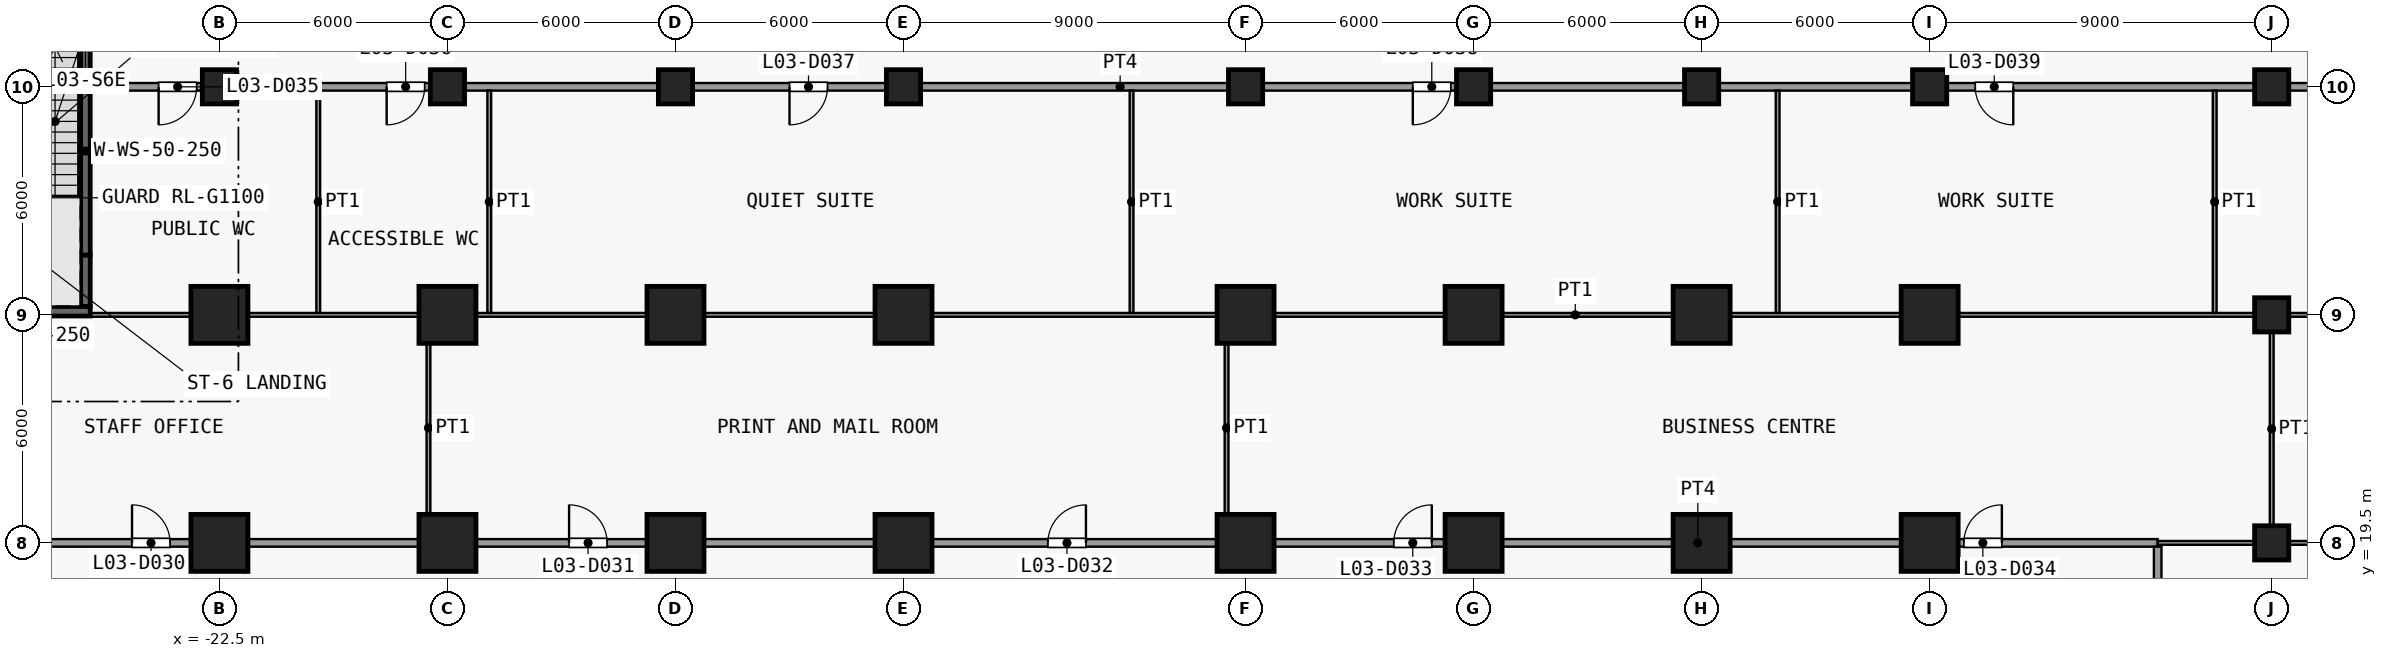
"""IFC4 building model, lengths in metres.
Left out: names, types, materials, properties, quantities, classifications, styles, units other than length and angle.
Written with IfcOpenShell. Run it as: python <this file> out.ifc"""

import sys

from ifc_helpers import new_model, si_unit, direction, frame, frame_2d, origin, origin_2d, place, context, subcontext, project, spatial, rectangle, extrude, element, fill, save


model = new_model("IFC4")
c1 = context("Model", 3, precision=1e-05, world=origin(), true_north=direction((0.0, 1.0)))
c2 = subcontext(c1, "Body", "Model", "MODEL_VIEW")
j1 = project(units=[si_unit("LENGTHUNIT", "METRE"), si_unit("PLANEANGLEUNIT", "RADIAN")], contexts=[c1])
p1 = place(None, origin())
s1 = spatial("IfcSite", under=j1, at=p1, CompositionType="ELEMENT")
p2 = place(p1, origin())
s2 = spatial("IfcBuilding", under=s1, at=p2, CompositionType="ELEMENT")
p3 = place(p2, frame((0.0, 0.0, 18.5)))
s3 = spatial("IfcBuildingStorey", under=s2, at=p3, CompositionType="ELEMENT", Elevation=18.5)
for number, where, z_axis, x_axis in (
    (1, (-22.5, 19.5, 0.0), (0.0, 0.0, 1.0), (1.0, 0.0, 0.0)),
    (2, (-22.5, 25.5, 0.0), (0.0, 0.0, 1.0), (1.0, 0.0, 0.0)),
):
    element("IfcColumn", number, at=place(p3, frame(where, z_axis=z_axis, x_axis=x_axis)), inside=s3, PredefinedType="COLUMN", context=c2, shape_type="SweptSolid", body=[
        extrude(rectangle(XDim=1.5, YDim=1.5, at=origin_2d()), origin(), (0.0, 0.0, 1.0), 5.0),
    ])
p4 = place(p3, frame((-22.5, 31.5, 0.0), z_axis=(0.0, 0.0, 1.0), x_axis=(1.0, 0.0, 0.0)))
e3 = element("IfcColumn", 3, at=p4, inside=s3, PredefinedType="COLUMN", context=c2, shape_type="SweptSolid", body=[
    extrude(rectangle(XDim=0.9, YDim=0.9, at=origin_2d()), origin(), (0.0, 0.0, 1.0), 5.0),
])
for number, where, z_axis, x_axis in (
    (4, (-16.5, 19.5, 0.0), (0.0, 0.0, 1.0), (1.0, 0.0, 0.0)),
    (5, (-16.5, 25.5, 0.0), (0.0, 0.0, 1.0), (1.0, 0.0, 0.0)),
):
    element("IfcColumn", number, at=place(p3, frame(where, z_axis=z_axis, x_axis=x_axis)), inside=s3, PredefinedType="COLUMN", context=c2, shape_type="SweptSolid", body=[
        extrude(rectangle(XDim=1.5, YDim=1.5, at=origin_2d()), origin(), (0.0, 0.0, 1.0), 5.0),
    ])
p5 = place(p3, frame((-16.5, 31.5, 0.0), z_axis=(0.0, 0.0, 1.0), x_axis=(1.0, 0.0, 0.0)))
e6 = element("IfcColumn", 6, at=p5, inside=s3, PredefinedType="COLUMN", context=c2, shape_type="SweptSolid", body=[
    extrude(rectangle(XDim=0.9, YDim=0.9, at=origin_2d()), origin(), (0.0, 0.0, 1.0), 5.0),
])
for number, where, z_axis, x_axis in (
    (7, (-10.5, 19.5, 0.0), (0.0, 0.0, 1.0), (1.0, 0.0, 0.0)),
    (8, (-10.5, 25.5, 0.0), (0.0, 0.0, 1.0), (1.0, 0.0, 0.0)),
):
    element("IfcColumn", number, at=place(p3, frame(where, z_axis=z_axis, x_axis=x_axis)), inside=s3, PredefinedType="COLUMN", context=c2, shape_type="SweptSolid", body=[
        extrude(rectangle(XDim=1.5, YDim=1.5, at=origin_2d()), origin(), (0.0, 0.0, 1.0), 5.0),
    ])
p6 = place(p3, frame((-10.5, 31.5, 0.0), z_axis=(0.0, 0.0, 1.0), x_axis=(1.0, 0.0, 0.0)))
e9 = element("IfcColumn", 9, at=p6, inside=s3, PredefinedType="COLUMN", context=c2, shape_type="SweptSolid", body=[
    extrude(rectangle(XDim=0.9, YDim=0.9, at=origin_2d()), origin(), (0.0, 0.0, 1.0), 5.0),
])
for number, where, z_axis, x_axis in (
    (10, (-4.5, 19.5, 0.0), (0.0, 0.0, 1.0), (1.0, 0.0, 0.0)),
    (11, (-4.5, 25.5, 0.0), (0.0, 0.0, 1.0), (1.0, 0.0, 0.0)),
):
    element("IfcColumn", number, at=place(p3, frame(where, z_axis=z_axis, x_axis=x_axis)), inside=s3, PredefinedType="COLUMN", context=c2, shape_type="SweptSolid", body=[
        extrude(rectangle(XDim=1.5, YDim=1.5, at=origin_2d()), origin(), (0.0, 0.0, 1.0), 5.0),
    ])
p7 = place(p3, frame((-4.5, 31.5, 0.0), z_axis=(0.0, 0.0, 1.0), x_axis=(1.0, 0.0, 0.0)))
e12 = element("IfcColumn", 12, at=p7, inside=s3, PredefinedType="COLUMN", context=c2, shape_type="SweptSolid", body=[
    extrude(rectangle(XDim=0.9, YDim=0.9, at=origin_2d()), origin(), (0.0, 0.0, 1.0), 5.0),
])
for number, where, z_axis, x_axis in (
    (13, (4.5, 19.5, 0.0), (0.0, 0.0, 1.0), (1.0, 0.0, 0.0)),
    (14, (4.5, 25.5, 0.0), (0.0, 0.0, 1.0), (1.0, 0.0, 0.0)),
):
    element("IfcColumn", number, at=place(p3, frame(where, z_axis=z_axis, x_axis=x_axis)), inside=s3, PredefinedType="COLUMN", context=c2, shape_type="SweptSolid", body=[
        extrude(rectangle(XDim=1.5, YDim=1.5, at=origin_2d()), origin(), (0.0, 0.0, 1.0), 5.0),
    ])
p8 = place(p3, frame((4.5, 31.5, 0.0), z_axis=(0.0, 0.0, 1.0), x_axis=(1.0, 0.0, 0.0)))
e15 = element("IfcColumn", 15, at=p8, inside=s3, PredefinedType="COLUMN", context=c2, shape_type="SweptSolid", body=[
    extrude(rectangle(XDim=0.9, YDim=0.9, at=origin_2d()), origin(), (0.0, 0.0, 1.0), 5.0),
])
for number, where, z_axis, x_axis in (
    (16, (10.5, 19.5, 0.0), (0.0, 0.0, 1.0), (1.0, 0.0, 0.0)),
    (17, (10.5, 25.5, 0.0), (0.0, 0.0, 1.0), (1.0, 0.0, 0.0)),
):
    element("IfcColumn", number, at=place(p3, frame(where, z_axis=z_axis, x_axis=x_axis)), inside=s3, PredefinedType="COLUMN", context=c2, shape_type="SweptSolid", body=[
        extrude(rectangle(XDim=1.5, YDim=1.5, at=origin_2d()), origin(), (0.0, 0.0, 1.0), 5.0),
    ])
p9 = place(p3, frame((10.5, 31.5, 0.0), z_axis=(0.0, 0.0, 1.0), x_axis=(1.0, 0.0, 0.0)))
e18 = element("IfcColumn", 18, at=p9, inside=s3, PredefinedType="COLUMN", context=c2, shape_type="SweptSolid", body=[
    extrude(rectangle(XDim=0.9, YDim=0.9, at=origin_2d()), origin(), (0.0, 0.0, 1.0), 5.0),
])
for number, where, z_axis, x_axis in (
    (19, (16.5, 19.5, 0.0), (0.0, 0.0, 1.0), (1.0, 0.0, 0.0)),
    (20, (16.5, 25.5, 0.0), (0.0, 0.0, 1.0), (1.0, 0.0, 0.0)),
):
    element("IfcColumn", number, at=place(p3, frame(where, z_axis=z_axis, x_axis=x_axis)), inside=s3, PredefinedType="COLUMN", context=c2, shape_type="SweptSolid", body=[
        extrude(rectangle(XDim=1.5, YDim=1.5, at=origin_2d()), origin(), (0.0, 0.0, 1.0), 5.0),
    ])
p10 = place(p3, frame((16.5, 31.5, 0.0), z_axis=(0.0, 0.0, 1.0), x_axis=(1.0, 0.0, 0.0)))
e21 = element("IfcColumn", 21, at=p10, inside=s3, PredefinedType="COLUMN", context=c2, shape_type="SweptSolid", body=[
    extrude(rectangle(XDim=0.9, YDim=0.9, at=origin_2d()), origin(), (0.0, 0.0, 1.0), 5.0),
])
for number, where, z_axis, x_axis in (
    (22, (22.5, 19.5, 0.0), (0.0, 0.0, 1.0), (1.0, 0.0, 0.0)),
    (23, (22.5, 25.5, 0.0), (0.0, 0.0, 1.0), (1.0, 0.0, 0.0)),
):
    element("IfcColumn", number, at=place(p3, frame(where, z_axis=z_axis, x_axis=x_axis)), inside=s3, PredefinedType="COLUMN", context=c2, shape_type="SweptSolid", body=[
        extrude(rectangle(XDim=1.5, YDim=1.5, at=origin_2d()), origin(), (0.0, 0.0, 1.0), 5.0),
    ])
for number, where, z_axis, x_axis in (
    (24, (22.5, 31.5, 0.0), (0.0, 0.0, 1.0), (1.0, 0.0, 0.0)),
    (25, (31.5, 19.5, 0.0), (0.0, 0.0, 1.0), (1.0, 0.0, 0.0)),
    (26, (31.5, 25.5, 0.0), (0.0, 0.0, 1.0), (1.0, 0.0, 0.0)),
    (27, (31.5, 31.5, 0.0), (0.0, 0.0, 1.0), (1.0, 0.0, 0.0)),
):
    element("IfcColumn", number, at=place(p3, frame(where, z_axis=z_axis, x_axis=x_axis)), inside=s3, PredefinedType="COLUMN", context=c2, shape_type="SweptSolid", body=[
        extrude(rectangle(XDim=0.9, YDim=0.9, at=origin_2d()), origin(), (0.0, 0.0, 1.0), 5.0),
    ])
p11 = place(p3, frame((-26.025, 27.07, 0.0), z_axis=(0.0, 0.0, 1.0), x_axis=(0.0, 1.0, 0.0)))
e28 = element("IfcWall", 28, at=p11, inside=s3, PredefinedType="SHEAR", context=c2, shape_type="SweptSolid", body=[
    extrude(rectangle(XDim=5.48, YDim=0.25, at=frame_2d((2.74, 0.0))), origin(), (0.0, 0.0, 1.0), 4.65),
])
p12 = place(p3, frame((-26.025, 25.72, 0.0), z_axis=(0.0, 0.0, 1.0), x_axis=(0.0, 1.0, 0.0)))
e29 = element("IfcWall", 29, at=p12, inside=s3, PredefinedType="SHEAR", context=c2, shape_type="SweptSolid", body=[
    extrude(rectangle(XDim=1.35, YDim=0.25, at=frame_2d((0.675, 0.0))), origin(), (0.0, 0.0, 1.0), 4.65),
])
p13 = place(p3, frame((-29.25, 25.595, 0.0), z_axis=(0.0, 0.0, 1.0), x_axis=(1.0, 0.0, 0.0)))
e30 = element("IfcWall", 30, at=p13, inside=s3, PredefinedType="SHEAR", context=c2, shape_type="SweptSolid", body=[
    extrude(rectangle(XDim=3.35, YDim=0.25, at=frame_2d((1.675, 0.0))), origin(), (0.0, 0.0, 1.0), 4.65),
])
p14 = place(p3, frame((-31.6, 19.5, 0.0), z_axis=(0.0, 0.0, 1.0), x_axis=(1.0, 0.0, 0.0)))
e31 = element("IfcWall", 31, at=p14, inside=s3, PredefinedType="PARTITIONING", context=c2, shape_type="SweptSolid", body=[
    extrude(rectangle(XDim=60.1, YDim=0.2, at=frame_2d((30.05, 0.0))), origin(), (0.0, 0.0, 1.0), 4.65),
])
p15 = place(p14, frame((6.8, 0.0, 0.0)))
e32 = element("IfcOpeningElement", 32, at=p15, cuts=e31, PredefinedType="OPENING", context=c2, shape_type="SweptSolid", body=[
    extrude(rectangle(XDim=1.0, YDim=2.1, at=frame_2d((0.5, 1.05))), frame((0.0, 0.11, 0.0), z_axis=(0.0, -1.0, 0.0), x_axis=(1.0, 0.0, 0.0)), (0.0, 0.0, 1.0), 0.22),
])
p16 = place(p14, frame((18.3, 0.0, 0.0)))
e33 = element("IfcOpeningElement", 33, at=p16, cuts=e31, PredefinedType="OPENING", context=c2, shape_type="SweptSolid", body=[
    extrude(rectangle(XDim=1.0, YDim=2.1, at=frame_2d((0.5, 1.05))), frame((0.0, 0.11, 0.0), z_axis=(0.0, -1.0, 0.0), x_axis=(1.0, 0.0, 0.0)), (0.0, 0.0, 1.0), 0.22),
])
p17 = place(p14, frame((30.9, 0.0, 0.0)))
e34 = element("IfcOpeningElement", 34, at=p17, cuts=e31, PredefinedType="OPENING", context=c2, shape_type="SweptSolid", body=[
    extrude(rectangle(XDim=1.0, YDim=2.1, at=frame_2d((0.5, 1.05))), frame((0.0, 0.11, 0.0), z_axis=(0.0, -1.0, 0.0), x_axis=(1.0, 0.0, 0.0)), (0.0, 0.0, 1.0), 0.22),
])
p18 = place(p14, frame((40.0, 0.0, 0.0)))
e35 = element("IfcOpeningElement", 35, at=p18, cuts=e31, PredefinedType="OPENING", context=c2, shape_type="SweptSolid", body=[
    extrude(rectangle(XDim=1.0, YDim=2.1, at=frame_2d((0.5, 1.05))), frame((0.0, 0.11, 0.0), z_axis=(0.0, -1.0, 0.0), x_axis=(1.0, 0.0, 0.0)), (0.0, 0.0, 1.0), 0.22),
])
p19 = place(p14, frame((55.0, 0.0, 0.0)))
e36 = element("IfcOpeningElement", 36, at=p19, cuts=e31, PredefinedType="OPENING", context=c2, shape_type="SweptSolid", body=[
    extrude(rectangle(XDim=1.0, YDim=2.1, at=frame_2d((0.5, 1.05))), frame((0.0, 0.11, 0.0), z_axis=(0.0, -1.0, 0.0), x_axis=(1.0, 0.0, 0.0)), (0.0, 0.0, 1.0), 0.22),
])
p20 = place(p3, frame((28.5, 19.5, 0.0), z_axis=(0.0, 0.0, 1.0), x_axis=(1.0, 0.0, 0.0)))
e37 = element("IfcWall", 37, at=p20, inside=s3, PredefinedType="PARTITIONING", context=c2, shape_type="SweptSolid", body=[
    extrude(rectangle(XDim=23.9, YDim=0.1, at=frame_2d((11.95, 0.0))), origin(), (0.0, 0.0, 1.0), 4.65),
])
p21 = place(p3, frame((-25.9, 25.5, 0.0), z_axis=(0.0, 0.0, 1.0), x_axis=(1.0, 0.0, 0.0)))
e38 = element("IfcWall", 38, at=p21, inside=s3, PredefinedType="PARTITIONING", context=c2, shape_type="SweptSolid", body=[
    extrude(rectangle(XDim=78.15, YDim=0.1, at=frame_2d((39.075, 0.0))), origin(), (0.0, 0.0, 1.0), 4.65),
])
p22 = place(p3, frame((-25.9, 31.5, 0.0), z_axis=(0.0, 0.0, 1.0), x_axis=(1.0, 0.0, 0.0)))
e39 = element("IfcWall", 39, at=p22, inside=s3, PredefinedType="PARTITIONING", context=c2, shape_type="SweptSolid", body=[
    extrude(rectangle(XDim=78.15, YDim=0.2, at=frame_2d((39.075, 0.0))), origin(), (0.0, 0.0, 1.0), 4.65),
])
p23 = place(p22, frame((1.8, 0.0, 0.0)))
e40 = element("IfcOpeningElement", 40, at=p23, cuts=e39, PredefinedType="OPENING", context=c2, shape_type="SweptSolid", body=[
    extrude(rectangle(XDim=1.0, YDim=2.1, at=frame_2d((0.5, 1.05))), frame((0.0, 0.11, 0.0), z_axis=(0.0, -1.0, 0.0), x_axis=(1.0, 0.0, 0.0)), (0.0, 0.0, 1.0), 0.22),
])
p24 = place(p22, frame((7.8, 0.0, 0.0)))
e41 = element("IfcOpeningElement", 41, at=p24, cuts=e39, PredefinedType="OPENING", context=c2, shape_type="SweptSolid", body=[
    extrude(rectangle(XDim=1.0, YDim=2.1, at=frame_2d((0.5, 1.05))), frame((0.0, 0.11, 0.0), z_axis=(0.0, -1.0, 0.0), x_axis=(1.0, 0.0, 0.0)), (0.0, 0.0, 1.0), 0.22),
])
p25 = place(p22, frame((18.4, 0.0, 0.0)))
e42 = element("IfcOpeningElement", 42, at=p25, cuts=e39, PredefinedType="OPENING", context=c2, shape_type="SweptSolid", body=[
    extrude(rectangle(XDim=1.0, YDim=2.1, at=frame_2d((0.5, 1.05))), frame((0.0, 0.11, 0.0), z_axis=(0.0, -1.0, 0.0), x_axis=(1.0, 0.0, 0.0)), (0.0, 0.0, 1.0), 0.22),
])
p26 = place(p22, frame((34.8, 0.0, 0.0)))
e43 = element("IfcOpeningElement", 43, at=p26, cuts=e39, PredefinedType="OPENING", context=c2, shape_type="SweptSolid", body=[
    extrude(rectangle(XDim=1.0, YDim=2.1, at=frame_2d((0.5, 1.05))), frame((0.0, 0.11, 0.0), z_axis=(0.0, -1.0, 0.0), x_axis=(1.0, 0.0, 0.0)), (0.0, 0.0, 1.0), 0.22),
])
p27 = place(p22, frame((49.6, 0.0, 0.0)))
e44 = element("IfcOpeningElement", 44, at=p27, cuts=e39, PredefinedType="OPENING", context=c2, shape_type="SweptSolid", body=[
    extrude(rectangle(XDim=1.0, YDim=2.1, at=frame_2d((0.5, 1.05))), frame((0.0, 0.11, 0.0), z_axis=(0.0, -1.0, 0.0), x_axis=(1.0, 0.0, 0.0)), (0.0, 0.0, 1.0), 0.22),
])
p28 = place(p22, frame((59.9, 0.0, 0.0)))
e45 = element("IfcOpeningElement", 45, at=p28, cuts=e39, PredefinedType="OPENING", context=c2, shape_type="SweptSolid", body=[
    extrude(rectangle(XDim=1.0, YDim=2.1, at=frame_2d((0.5, 1.05))), frame((0.0, 0.11, 0.0), z_axis=(0.0, -1.0, 0.0), x_axis=(1.0, 0.0, 0.0)), (0.0, 0.0, 1.0), 0.22),
])
p29 = place(p22, frame((73.2, 0.0, 0.0)))
e46 = element("IfcOpeningElement", 46, at=p29, cuts=e39, PredefinedType="OPENING", context=c2, shape_type="SweptSolid", body=[
    extrude(rectangle(XDim=1.0, YDim=2.1, at=frame_2d((0.5, 1.05))), frame((0.0, 0.11, 0.0), z_axis=(0.0, -1.0, 0.0), x_axis=(1.0, 0.0, 0.0)), (0.0, 0.0, 1.0), 0.22),
])
for number, where, z_axis, x_axis in (
    (47, (-19.9, 25.55, 0.0), (0.0, 0.0, 1.0), (0.0, 1.0, 0.0)),
    (48, (-17.0, 19.6, 0.0), (0.0, 0.0, 1.0), (0.0, 1.0, 0.0)),
    (49, (-15.4, 25.55, 0.0), (0.0, 0.0, 1.0), (0.0, 1.0, 0.0)),
    (50, (1.5, 25.55, 0.0), (0.0, 0.0, 1.0), (0.0, 1.0, 0.0)),
    (51, (4.0, 19.6, 0.0), (0.0, 0.0, 1.0), (0.0, 1.0, 0.0)),
    (52, (18.5, 25.55, 0.0), (0.0, 0.0, 1.0), (0.0, 1.0, 0.0)),
):
    element("IfcWall", number, at=place(p3, frame(where, z_axis=z_axis, x_axis=x_axis)), inside=s3, PredefinedType="PARTITIONING", context=c2, shape_type="SweptSolid", body=[
        extrude(rectangle(XDim=5.85, YDim=0.1, at=frame_2d((2.925, 0.0))), origin(), (0.0, 0.0, 1.0), 4.65),
    ])
p30 = place(p3, frame((28.5, 16.6, 0.0), z_axis=(0.0, 0.0, 1.0), x_axis=(0.0, 1.0, 0.0)))
e53 = element("IfcWall", 53, at=p30, inside=s3, PredefinedType="PARTITIONING", context=c2, shape_type="SweptSolid", body=[
    extrude(rectangle(XDim=2.8, YDim=0.2, at=frame_2d((1.4, 0.0))), origin(), (0.0, 0.0, 1.0), 4.65),
])
p31 = place(p3, frame((30.0, 25.55, 0.0), z_axis=(0.0, 0.0, 1.0), x_axis=(0.0, 1.0, 0.0)))
e54 = element("IfcWall", 54, at=p31, inside=s3, PredefinedType="PARTITIONING", context=c2, shape_type="SweptSolid", body=[
    extrude(rectangle(XDim=5.85, YDim=0.1, at=frame_2d((2.925, 0.0))), origin(), (0.0, 0.0, 1.0), 4.65),
])
p32 = place(p3, frame((31.5, 19.55, 0.0), z_axis=(0.0, 0.0, 1.0), x_axis=(0.0, 1.0, 0.0)))
e55 = element("IfcWall", 55, at=p32, inside=s3, PredefinedType="PARTITIONING", context=c2, shape_type="SweptSolid", body=[
    extrude(rectangle(XDim=5.9, YDim=0.1, at=frame_2d((2.95, 0.0))), origin(), (0.0, 0.0, 1.0), 4.65),
])
p33 = place(p15, origin())
e56 = element("IfcDoor", 56, at=p33, inside=s3, OperationType="SINGLE_SWING_RIGHT", PredefinedType="DOOR", context=c2, shape_type="SweptSolid", body=[
    extrude(rectangle(XDim=1.0, YDim=2.1, at=frame_2d((0.5, 1.05))), frame((0.0, 0.025, 0.0), z_axis=(0.0, -1.0, 0.0), x_axis=(1.0, 0.0, 0.0)), (0.0, 0.0, 1.0), 0.05),
])
fill(e32, e56)
p34 = place(p16, origin())
e57 = element("IfcDoor", 57, at=p34, inside=s3, OperationType="SINGLE_SWING_RIGHT", PredefinedType="DOOR", context=c2, shape_type="SweptSolid", body=[
    extrude(rectangle(XDim=1.0, YDim=2.1, at=frame_2d((0.5, 1.05))), frame((0.0, 0.025, 0.0), z_axis=(0.0, -1.0, 0.0), x_axis=(1.0, 0.0, 0.0)), (0.0, 0.0, 1.0), 0.05),
])
fill(e33, e57)
p35 = place(p17, origin())
e58 = element("IfcDoor", 58, at=p35, inside=s3, OperationType="SINGLE_SWING_LEFT", PredefinedType="DOOR", context=c2, shape_type="SweptSolid", body=[
    extrude(rectangle(XDim=1.0, YDim=2.1, at=frame_2d((0.5, 1.05))), frame((0.0, 0.025, 0.0), z_axis=(0.0, -1.0, 0.0), x_axis=(1.0, 0.0, 0.0)), (0.0, 0.0, 1.0), 0.05),
])
fill(e34, e58)
p36 = place(p18, origin())
e59 = element("IfcDoor", 59, at=p36, inside=s3, OperationType="SINGLE_SWING_LEFT", PredefinedType="DOOR", context=c2, shape_type="SweptSolid", body=[
    extrude(rectangle(XDim=1.0, YDim=2.1, at=frame_2d((0.5, 1.05))), frame((0.0, 0.025, 0.0), z_axis=(0.0, -1.0, 0.0), x_axis=(1.0, 0.0, 0.0)), (0.0, 0.0, 1.0), 0.05),
])
fill(e35, e59)
p37 = place(p19, origin())
e60 = element("IfcDoor", 60, at=p37, inside=s3, OperationType="SINGLE_SWING_LEFT", PredefinedType="DOOR", context=c2, shape_type="SweptSolid", body=[
    extrude(rectangle(XDim=1.0, YDim=2.1, at=frame_2d((0.5, 1.05))), frame((0.0, 0.025, 0.0), z_axis=(0.0, -1.0, 0.0), x_axis=(1.0, 0.0, 0.0)), (0.0, 0.0, 1.0), 0.05),
])
fill(e36, e60)
p38 = place(p23, origin())
e61 = element("IfcDoor", 61, at=p38, inside=s3, OperationType="SINGLE_SWING_LEFT", PredefinedType="DOOR", context=c2, shape_type="SweptSolid", body=[
    extrude(rectangle(XDim=1.0, YDim=2.1, at=frame_2d((0.5, 1.05))), frame((0.0, 0.025, 0.0), z_axis=(0.0, -1.0, 0.0), x_axis=(1.0, 0.0, 0.0)), (0.0, 0.0, 1.0), 0.05),
])
fill(e40, e61)
p39 = place(p24, origin())
e62 = element("IfcDoor", 62, at=p39, inside=s3, OperationType="SINGLE_SWING_LEFT", PredefinedType="DOOR", context=c2, shape_type="SweptSolid", body=[
    extrude(rectangle(XDim=1.0, YDim=2.1, at=frame_2d((0.5, 1.05))), frame((0.0, 0.025, 0.0), z_axis=(0.0, -1.0, 0.0), x_axis=(1.0, 0.0, 0.0)), (0.0, 0.0, 1.0), 0.05),
])
fill(e41, e62)
p40 = place(p25, origin())
e63 = element("IfcDoor", 63, at=p40, inside=s3, OperationType="SINGLE_SWING_LEFT", PredefinedType="DOOR", context=c2, shape_type="SweptSolid", body=[
    extrude(rectangle(XDim=1.0, YDim=2.1, at=frame_2d((0.5, 1.05))), frame((0.0, 0.025, 0.0), z_axis=(0.0, -1.0, 0.0), x_axis=(1.0, 0.0, 0.0)), (0.0, 0.0, 1.0), 0.05),
])
fill(e42, e63)
p41 = place(p26, origin())
e64 = element("IfcDoor", 64, at=p41, inside=s3, OperationType="SINGLE_SWING_LEFT", PredefinedType="DOOR", context=c2, shape_type="SweptSolid", body=[
    extrude(rectangle(XDim=1.0, YDim=2.1, at=frame_2d((0.5, 1.05))), frame((0.0, 0.025, 0.0), z_axis=(0.0, -1.0, 0.0), x_axis=(1.0, 0.0, 0.0)), (0.0, 0.0, 1.0), 0.05),
])
fill(e43, e64)
p42 = place(p27, origin())
e65 = element("IfcDoor", 65, at=p42, inside=s3, OperationType="SINGLE_SWING_RIGHT", PredefinedType="DOOR", context=c2, shape_type="SweptSolid", body=[
    extrude(rectangle(XDim=1.0, YDim=2.1, at=frame_2d((0.5, 1.05))), frame((0.0, 0.025, 0.0), z_axis=(0.0, -1.0, 0.0), x_axis=(1.0, 0.0, 0.0)), (0.0, 0.0, 1.0), 0.05),
])
fill(e44, e65)
save(model, sys.argv[1])
